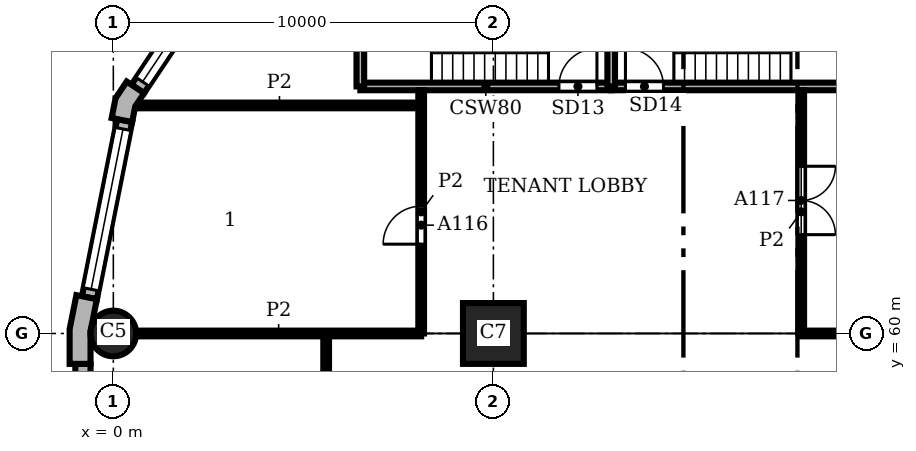
"""IFC4 building model, lengths in metres.
Left out: names, types, materials, properties, quantities, classifications, styles, units other than length and angle.
Written with IfcOpenShell. Run it as: python <this file> out.ifc"""

import sys

from ifc_helpers import new_model, si_unit, direction, frame, frame_2d, origin, origin_2d, place, context, subcontext, project, spatial, polyline, rectangle, circle, outline, extrude, element, fill, save


model = new_model("IFC4")
c1 = context("Model", 3, precision=1e-05, world=origin(), true_north=direction((0.0, 1.0)))
c2 = subcontext(c1, "Body", "Model", "MODEL_VIEW")
j1 = project(units=[si_unit("LENGTHUNIT", "METRE"), si_unit("PLANEANGLEUNIT", "RADIAN")], contexts=[c1])
p1 = place(None, origin())
s1 = spatial("IfcSite", under=j1, at=p1, CompositionType="ELEMENT")
p2 = place(p1, origin())
s2 = spatial("IfcBuilding", under=s1, at=p2, CompositionType="ELEMENT")
p3 = place(p2, frame((0.0, 0.0, 12.0)))
s3 = spatial("IfcBuildingStorey", under=s2, at=p3, CompositionType="ELEMENT", Elevation=12.0)
p4 = place(p3, frame((0.0, 60.0, 0.0), z_axis=(0.0, 0.0, 1.0), x_axis=(1.0, 0.0, 0.0)))
e1 = element("IfcColumn", 1, at=p4, inside=s3, PredefinedType="COLUMN", context=c2, shape_type="SweptSolid", body=[
    extrude(circle(Radius=0.6, at=origin_2d()), origin(), (0.0, 0.0, 1.0), 3.9),
])
p5 = place(p3, frame((10.0, 60.0, 0.0), z_axis=(0.0, 0.0, 1.0), x_axis=(1.0, 0.0, 0.0)))
e2 = element("IfcColumn", 2, at=p5, inside=s3, PredefinedType="COLUMN", context=c2, shape_type="SweptSolid", body=[
    extrude(rectangle(XDim=1.6, YDim=1.6, at=origin_2d()), origin(), (0.0, 0.0, 1.0), 3.9),
])
p6 = place(p3, origin())
e3 = element("IfcWall", 3, at=p6, inside=s3, PredefinedType="SOLIDWALL", context=c2, shape_type="SweptSolid", body=[
    extrude(outline(polyline([(0.477, 66.545), (0.352, 66.629), (0.059, 66.189), (-0.045, 65.67), (0.103, 65.641), (0.495, 65.563), (0.577, 65.974), (0.81, 66.323), (0.477, 66.545)])), origin(), (0.0, 0.0, 1.0), 3.9),
])
e4 = element("IfcWall", 4, at=p6, inside=s3, PredefinedType="SOLIDWALL", context=c2, shape_type="SweptSolid", body=[
    extrude(outline(polyline([(-0.825, 60.98), (-0.972, 61.009), (-1.15, 60.113), (-1.15, 59.2), (-1.0, 59.2), (-0.6, 59.2), (-0.6, 60.059), (-0.432, 60.902), (-0.825, 60.98)])), origin(), (0.0, 0.0, 1.0), 3.9),
])
p7 = place(p3, frame((3.284, 70.386, 0.0), z_axis=(0.0, 0.0, 1.0), x_axis=(-0.555541552266, -0.831488775454, 0.0)))
e5 = element("IfcWall", 5, at=p7, inside=s3, PredefinedType="SOLIDWALL", context=c2, shape_type="SweptSolid", body=[
    extrude(rectangle(XDim=4.753, YDim=0.4, at=frame_2d((2.376, 0.0))), origin(), (0.0, 0.0, 1.0), 3.9),
])
p8 = place(p7, frame((0.226, 0.0, 0.9)))
e6 = element("IfcOpeningElement", 6, at=p8, cuts=e5, PredefinedType="OPENING", context=c2, shape_type="SweptSolid", body=[
    extrude(rectangle(XDim=4.3, YDim=2.35, at=frame_2d((2.15, 1.175))), frame((0.0, 0.21, 0.0), z_axis=(0.0, -1.0, 0.0), x_axis=(1.0, 0.0, 0.0)), (0.0, 0.0, 1.0), 0.42),
])
p9 = place(p3, frame((0.299, 65.602, 0.0), z_axis=(0.0, 0.0, 1.0), x_axis=(-0.195098533057, -0.98078364709, 0.0)))
e7 = element("IfcWall", 7, at=p9, inside=s3, PredefinedType="SOLIDWALL", context=c2, shape_type="SweptSolid", body=[
    extrude(rectangle(XDim=4.753, YDim=0.4, at=frame_2d((2.376, 0.0))), origin(), (0.0, 0.0, 1.0), 3.9),
])
p10 = place(p9, frame((0.226, 0.0, 0.9)))
e8 = element("IfcOpeningElement", 8, at=p10, cuts=e7, PredefinedType="OPENING", context=c2, shape_type="SweptSolid", body=[
    extrude(rectangle(XDim=4.3, YDim=2.35, at=frame_2d((2.15, 1.175))), frame((0.0, 0.21, 0.0), z_axis=(0.0, -1.0, 0.0), x_axis=(1.0, 0.0, 0.0)), (0.0, 0.0, 1.0), 0.42),
])
p11 = place(p3, frame((-0.8, 59.2, 0.0), z_axis=(0.0, 0.0, 1.0), x_axis=(0.0, -1.0, 0.0)))
e9 = element("IfcWall", 9, at=p11, inside=s3, PredefinedType="SOLIDWALL", context=c2, shape_type="SweptSolid", body=[
    extrude(rectangle(XDim=18.4, YDim=0.4, at=frame_2d((9.2, 0.0))), origin(), (0.0, 0.0, 1.0), 3.9),
])
p12 = place(p11, frame((3.75, 0.0, 0.9)))
e10 = element("IfcOpeningElement", 10, at=p12, cuts=e9, PredefinedType="OPENING", context=c2, shape_type="SweptSolid", body=[
    extrude(rectangle(XDim=0.9, YDim=2.35, at=frame_2d((0.45, 1.175))), frame((0.0, 0.21, 0.0), z_axis=(0.0, -1.0, 0.0), x_axis=(1.0, 0.0, 0.0)), (0.0, 0.0, 1.0), 0.42),
])
p13 = place(p11, frame((13.75, 0.0, 0.9)))
e11 = element("IfcOpeningElement", 11, at=p13, cuts=e9, PredefinedType="OPENING", context=c2, shape_type="SweptSolid", body=[
    extrude(rectangle(XDim=0.9, YDim=2.35, at=frame_2d((0.45, 1.175))), frame((0.0, 0.21, 0.0), z_axis=(0.0, -1.0, 0.0), x_axis=(1.0, 0.0, 0.0)), (0.0, 0.0, 1.0), 0.42),
])
p14 = place(p3, frame((6.5, 66.5, 0.0), z_axis=(0.0, 0.0, 1.0), x_axis=(1.0, 0.0, 0.0)))
e12 = element("IfcWall", 12, at=p14, inside=s3, PredefinedType="SHEAR", context=c2, shape_type="SweptSolid", body=[
    extrude(rectangle(XDim=6.6, YDim=0.2, at=frame_2d((3.3, 0.0))), origin(), (0.0, 0.0, 1.0), 3.58),
])
p15 = place(p14, frame((5.225, 0.0, 0.0)))
e13 = element("IfcOpeningElement", 13, at=p15, cuts=e12, PredefinedType="OPENING", context=c2, shape_type="SweptSolid", body=[
    extrude(rectangle(XDim=1.0, YDim=2.1, at=frame_2d((0.5, 1.05))), frame((0.0, 0.11, 0.0), z_axis=(0.0, -1.0, 0.0), x_axis=(1.0, 0.0, 0.0)), (0.0, 0.0, 1.0), 0.22),
])
p16 = place(p3, frame((13.1, 66.5, 0.0), z_axis=(0.0, 0.0, 1.0), x_axis=(1.0, 0.0, 0.0)))
e14 = element("IfcWall", 14, at=p16, inside=s3, PredefinedType="SHEAR", context=c2, shape_type="SweptSolid", body=[
    extrude(rectangle(XDim=6.6, YDim=0.2, at=frame_2d((3.3, 0.0))), origin(), (0.0, 0.0, 1.0), 3.58),
])
p17 = place(p16, frame((0.375, 0.0, 0.0)))
e15 = element("IfcOpeningElement", 15, at=p17, cuts=e14, PredefinedType="OPENING", context=c2, shape_type="SweptSolid", body=[
    extrude(rectangle(XDim=1.0, YDim=2.1, at=frame_2d((0.5, 1.05))), frame((0.0, 0.11, 0.0), z_axis=(0.0, -1.0, 0.0), x_axis=(1.0, 0.0, 0.0)), (0.0, 0.0, 1.0), 0.22),
])
for number, where, z_axis, x_axis in (
    (16, (6.5, 66.5, 0.0), (0.0, 0.0, 1.0), (0.0, 1.0, 0.0)),
    (17, (13.1, 66.5, 0.0), (0.0, 0.0, 1.0), (0.0, 1.0, 0.0)),
):
    element("IfcWall", number, at=place(p3, frame(where, z_axis=z_axis, x_axis=x_axis)), inside=s3, PredefinedType="SHEAR", context=c2, shape_type="SweptSolid", body=[
        extrude(rectangle(XDim=3.3, YDim=0.2, at=frame_2d((1.65, 0.0))), origin(), (0.0, 0.0, 1.0), 3.58),
    ])
p18 = place(p3, frame((5.6, 5.6, 0.0), z_axis=(0.0, 0.0, 1.0), x_axis=(0.0, 1.0, 0.0)))
e18 = element("IfcWall", 18, at=p18, inside=s3, PredefinedType="PARTITIONING", context=c2, shape_type="SweptSolid", body=[
    extrude(rectangle(XDim=54.4, YDim=0.15, at=frame_2d((27.2, 0.0))), origin(), (0.0, 0.0, 1.0), 3.58),
])
p19 = place(p18, frame((6.25, 0.0, 0.0)))
e19 = element("IfcOpeningElement", 19, at=p19, cuts=e18, PredefinedType="OPENING", context=c2, shape_type="SweptSolid", body=[
    extrude(rectangle(XDim=0.8, YDim=2.1, at=frame_2d((0.4, 1.05))), frame((0.0, 0.085, 0.0), z_axis=(0.0, -1.0, 0.0), x_axis=(1.0, 0.0, 0.0)), (0.0, 0.0, 1.0), 0.17),
])
p20 = place(p18, frame((11.25, 0.0, 0.0)))
e20 = element("IfcOpeningElement", 20, at=p20, cuts=e18, PredefinedType="OPENING", context=c2, shape_type="SweptSolid", body=[
    extrude(rectangle(XDim=1.1, YDim=2.1, at=frame_2d((0.55, 1.05))), frame((0.0, 0.085, 0.0), z_axis=(0.0, -1.0, 0.0), x_axis=(1.0, 0.0, 0.0)), (0.0, 0.0, 1.0), 0.17),
])
p21 = place(p18, frame((20.0, 0.0, 0.0)))
e21 = element("IfcOpeningElement", 21, at=p21, cuts=e18, PredefinedType="OPENING", context=c2, shape_type="SweptSolid", body=[
    extrude(rectangle(XDim=1.0, YDim=2.1, at=frame_2d((0.5, 1.05))), frame((0.0, 0.085, 0.0), z_axis=(0.0, -1.0, 0.0), x_axis=(1.0, 0.0, 0.0)), (0.0, 0.0, 1.0), 0.17),
])
p22 = place(p18, frame((30.05, 0.0, 0.0)))
e22 = element("IfcOpeningElement", 22, at=p22, cuts=e18, PredefinedType="OPENING", context=c2, shape_type="SweptSolid", body=[
    extrude(rectangle(XDim=1.0, YDim=2.1, at=frame_2d((0.5, 1.05))), frame((0.0, 0.085, 0.0), z_axis=(0.0, -1.0, 0.0), x_axis=(1.0, 0.0, 0.0)), (0.0, 0.0, 1.0), 0.17),
])
p23 = place(p18, frame((38.5, 0.0, 0.0)))
e23 = element("IfcOpeningElement", 23, at=p23, cuts=e18, PredefinedType="OPENING", context=c2, shape_type="SweptSolid", body=[
    extrude(rectangle(XDim=1.0, YDim=2.1, at=frame_2d((0.5, 1.05))), frame((0.0, 0.085, 0.0), z_axis=(0.0, -1.0, 0.0), x_axis=(1.0, 0.0, 0.0)), (0.0, 0.0, 1.0), 0.17),
])
p24 = place(p18, frame((47.5, 0.0, 0.0)))
e24 = element("IfcOpeningElement", 24, at=p24, cuts=e18, PredefinedType="OPENING", context=c2, shape_type="SweptSolid", body=[
    extrude(rectangle(XDim=1.0, YDim=2.1, at=frame_2d((0.5, 1.05))), frame((0.0, 0.085, 0.0), z_axis=(0.0, -1.0, 0.0), x_axis=(1.0, 0.0, 0.0)), (0.0, 0.0, 1.0), 0.17),
])
p25 = place(p3, frame((8.1, 60.0, 0.0), z_axis=(0.0, 0.0, 1.0), x_axis=(0.0, 1.0, 0.0)))
e25 = element("IfcWall", 25, at=p25, inside=s3, PredefinedType="PARTITIONING", context=c2, shape_type="SweptSolid", body=[
    extrude(rectangle(XDim=6.4, YDim=0.15, at=frame_2d((3.2, 0.0))), origin(), (0.0, 0.0, 1.0), 3.58),
])
p26 = place(p25, frame((2.35, 0.0, 0.0)))
e26 = element("IfcOpeningElement", 26, at=p26, cuts=e25, PredefinedType="OPENING", context=c2, shape_type="SweptSolid", body=[
    extrude(rectangle(XDim=1.0, YDim=2.1, at=frame_2d((0.5, 1.05))), frame((0.0, 0.085, 0.0), z_axis=(0.0, -1.0, 0.0), x_axis=(1.0, 0.0, 0.0)), (0.0, 0.0, 1.0), 0.17),
])
p27 = place(p3, frame((18.1, 60.0, 0.0), z_axis=(0.0, 0.0, 1.0), x_axis=(0.0, 1.0, 0.0)))
e27 = element("IfcWall", 27, at=p27, inside=s3, PredefinedType="PARTITIONING", context=c2, shape_type="SweptSolid", body=[
    extrude(rectangle(XDim=6.4, YDim=0.15, at=frame_2d((3.2, 0.0))), origin(), (0.0, 0.0, 1.0), 3.58),
])
p28 = place(p27, frame((2.6, 0.0, 0.0)))
e28 = element("IfcOpeningElement", 28, at=p28, cuts=e27, PredefinedType="OPENING", context=c2, shape_type="SweptSolid", body=[
    extrude(rectangle(XDim=1.8, YDim=2.1, at=frame_2d((0.9, 1.05))), frame((0.0, 0.085, 0.0), z_axis=(0.0, -1.0, 0.0), x_axis=(1.0, 0.0, 0.0)), (0.0, 0.0, 1.0), 0.17),
])
p29 = place(p3, frame((0.6, 60.0, 0.0), z_axis=(0.0, 0.0, 1.0), x_axis=(1.0, 0.0, 0.0)))
e29 = element("IfcWall", 29, at=p29, inside=s3, PredefinedType="PARTITIONING", context=c2, shape_type="SweptSolid", body=[
    extrude(rectangle(XDim=7.5, YDim=0.15, at=frame_2d((3.75, 0.0))), origin(), (0.0, 0.0, 1.0), 3.58),
])
p30 = place(p3, frame((18.1, 60.0, 0.0), z_axis=(0.0, 0.0, 1.0), x_axis=(1.0, 0.0, 0.0)))
e30 = element("IfcWall", 30, at=p30, inside=s3, PredefinedType="PARTITIONING", context=c2, shape_type="SweptSolid", body=[
    extrude(rectangle(XDim=1.1, YDim=0.15, at=frame_2d((0.55, 0.0))), origin(), (0.0, 0.0, 1.0), 3.58),
])
p31 = place(p3, frame((0.644, 66.0, 0.0), z_axis=(0.0, 0.0, 1.0), x_axis=(1.0, 0.0, 0.0)))
e31 = element("IfcWall", 31, at=p31, inside=s3, PredefinedType="PARTITIONING", context=c2, shape_type="SweptSolid", body=[
    extrude(rectangle(XDim=7.456, YDim=0.15, at=frame_2d((3.728, 0.0))), origin(), (0.0, 0.0, 1.0), 3.58),
])
p32 = place(p8, origin())
e32 = element("IfcWindow", 32, at=p32, inside=s3, PartitioningType="SINGLE_PANEL", PredefinedType="WINDOW", context=c2, shape_type="SweptSolid", body=[
    extrude(rectangle(XDim=4.3, YDim=2.35, at=frame_2d((2.15, 1.175))), frame((0.0, 0.16, 0.0), z_axis=(0.0, -1.0, 0.0), x_axis=(1.0, 0.0, 0.0)), (0.0, 0.0, 1.0), 0.06),
])
fill(e6, e32)
p33 = place(p10, origin())
e33 = element("IfcWindow", 33, at=p33, inside=s3, PartitioningType="SINGLE_PANEL", PredefinedType="WINDOW", context=c2, shape_type="SweptSolid", body=[
    extrude(rectangle(XDim=4.3, YDim=2.35, at=frame_2d((2.15, 1.175))), frame((0.0, 0.16, 0.0), z_axis=(0.0, -1.0, 0.0), x_axis=(1.0, 0.0, 0.0)), (0.0, 0.0, 1.0), 0.06),
])
fill(e8, e33)
p34 = place(p15, origin())
e34 = element("IfcDoor", 34, at=p34, inside=s3, OperationType="SINGLE_SWING_RIGHT", PredefinedType="DOOR", context=c2, shape_type="SweptSolid", body=[
    extrude(rectangle(XDim=1.0, YDim=2.1, at=frame_2d((0.5, 1.05))), frame((0.0, 0.025, 0.0), z_axis=(0.0, -1.0, 0.0), x_axis=(1.0, 0.0, 0.0)), (0.0, 0.0, 1.0), 0.05),
])
fill(e13, e34)
p35 = place(p17, origin())
e35 = element("IfcDoor", 35, at=p35, inside=s3, OperationType="SINGLE_SWING_LEFT", PredefinedType="DOOR", context=c2, shape_type="SweptSolid", body=[
    extrude(rectangle(XDim=1.0, YDim=2.1, at=frame_2d((0.5, 1.05))), frame((0.0, 0.025, 0.0), z_axis=(0.0, -1.0, 0.0), x_axis=(1.0, 0.0, 0.0)), (0.0, 0.0, 1.0), 0.05),
])
fill(e15, e35)
p36 = place(p26, origin())
e36 = element("IfcDoor", 36, at=p36, inside=s3, OperationType="SINGLE_SWING_LEFT", PredefinedType="DOOR", context=c2, shape_type="SweptSolid", body=[
    extrude(rectangle(XDim=1.0, YDim=2.1, at=frame_2d((0.5, 1.05))), frame((0.0, 0.025, 0.0), z_axis=(0.0, -1.0, 0.0), x_axis=(1.0, 0.0, 0.0)), (0.0, 0.0, 1.0), 0.05),
])
fill(e26, e36)
p37 = place(p28, frame((1.8, 0.0, 0.0), z_axis=(0.0, 0.0, 1.0), x_axis=(-1.0, 0.0, 0.0)))
e37 = element("IfcDoor", 37, at=p37, inside=s3, OperationType="DOUBLE_DOOR_SINGLE_SWING", PredefinedType="DOOR", context=c2, shape_type="SweptSolid", body=[
    extrude(rectangle(XDim=1.8, YDim=2.1, at=frame_2d((0.9, 1.05))), frame((0.0, 0.025, 0.0), z_axis=(0.0, -1.0, 0.0), x_axis=(1.0, 0.0, 0.0)), (0.0, 0.0, 1.0), 0.05),
])
fill(e28, e37)
save(model, sys.argv[1])
